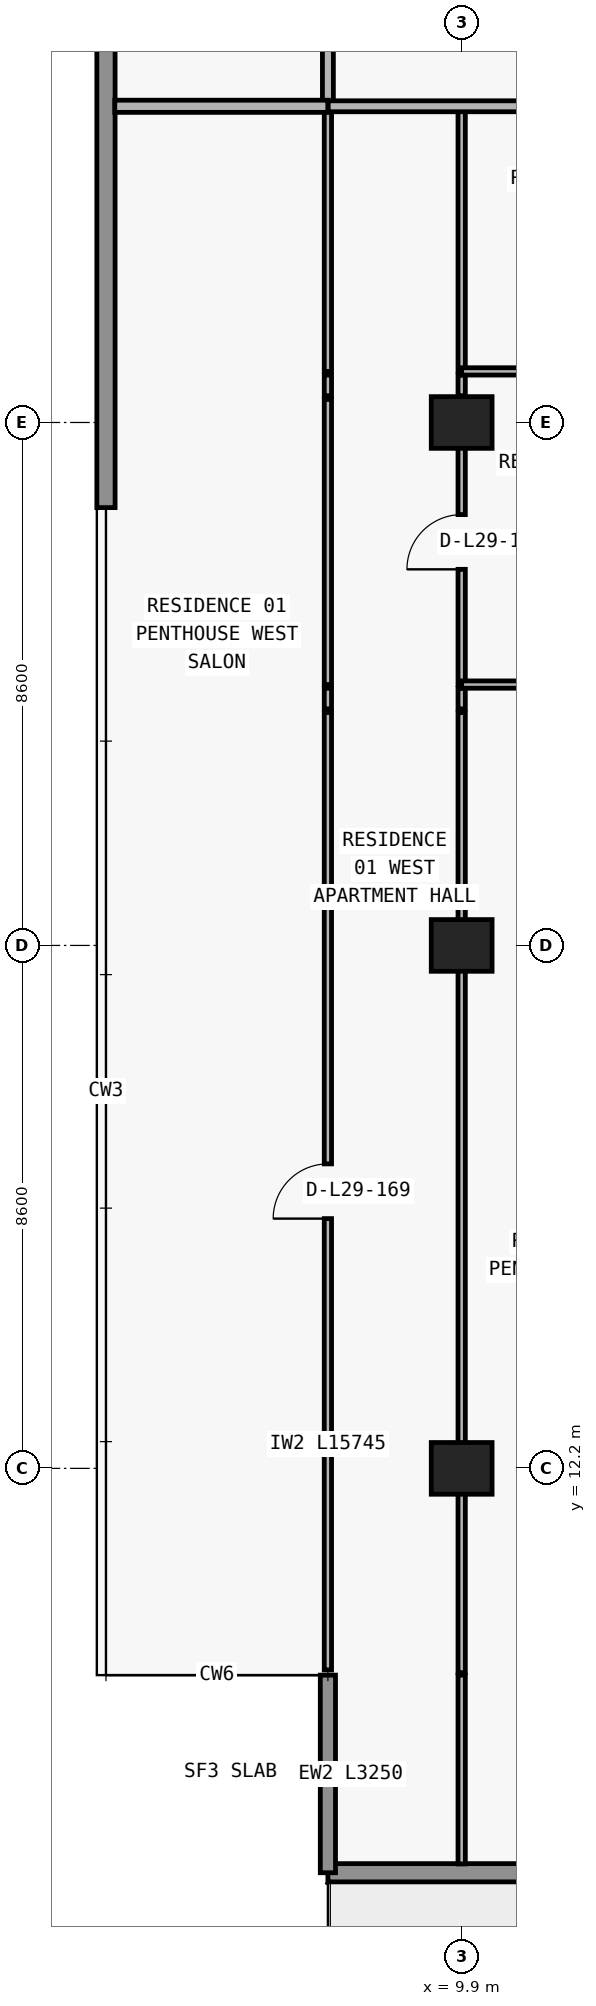
"""IFC4 building model, lengths in metres.
Left out: names, types, materials, properties, quantities, classifications, styles, units other than length and angle.
Written with IfcOpenShell. Run it as: python <this file> out.ifc"""

import sys

from ifc_helpers import new_model, si_unit, direction, frame, frame_2d, origin, origin_2d, place, context, subcontext, project, spatial, rectangle, extrude, element, fill, save


model = new_model("IFC4")
c1 = context("Model", 3, precision=1e-05, world=origin(), true_north=direction((0.0, 1.0)))
c2 = subcontext(c1, "Body", "Model", "MODEL_VIEW")
j1 = project(units=[si_unit("LENGTHUNIT", "METRE"), si_unit("PLANEANGLEUNIT", "RADIAN")], contexts=[c1])
p1 = place(None, origin())
s1 = spatial("IfcSite", under=j1, at=p1, CompositionType="ELEMENT")
p2 = place(p1, origin())
s2 = spatial("IfcBuilding", under=s1, at=p2, CompositionType="ELEMENT")
p3 = place(p2, frame((0.0, 0.0, 109.2)))
s3 = spatial("IfcBuildingStorey", under=s2, at=p3, CompositionType="ELEMENT", Elevation=109.2)
for number, where, z_axis, x_axis in (
    (1, (9.9, 12.2, 0.0), (0.0, 0.0, 1.0), (1.0, 0.0, 0.0)),
    (2, (9.9, 20.8, 0.0), (0.0, 0.0, 1.0), (1.0, 0.0, 0.0)),
    (3, (9.9, 29.4, 0.0), (0.0, 0.0, 1.0), (1.0, 0.0, 0.0)),
):
    element("IfcColumn", number, at=place(p3, frame(where, z_axis=z_axis, x_axis=x_axis)), inside=s3, PredefinedType="COLUMN", context=c2, shape_type="SweptSolid", body=[
        extrude(rectangle(XDim=1.0, YDim=0.85, at=origin_2d()), origin(), (0.0, 0.0, 1.0), 3.05),
    ])
p4 = place(p3, frame((70.1, 5.55, 0.0), z_axis=(0.0, 0.0, 1.0), x_axis=(-1.0, 0.0, 0.0)))
e4 = element("IfcWall", 4, at=p4, inside=s3, PredefinedType="STANDARD", context=c2, shape_type="SweptSolid", body=[
    extrude(rectangle(XDim=62.4, YDim=0.3, at=frame_2d((31.2, 0.0))), origin(), (0.0, 0.0, 1.0), 3.05),
])
p5 = place(p4, frame((57.226, 0.0, 0.0)))
e5 = element("IfcOpeningElement", 5, at=p5, cuts=e4, PredefinedType="OPENING", context=c2, shape_type="SweptSolid", body=[
    extrude(rectangle(XDim=2.0, YDim=2.3, at=frame_2d((1.0, 1.15))), frame((0.0, 0.16, 0.0), z_axis=(0.0, -1.0, 0.0), x_axis=(1.0, 0.0, 0.0)), (0.0, 0.0, 1.0), 0.32),
])
p6 = place(p4, frame((52.926, 0.0, 0.85)))
e6 = element("IfcOpeningElement", 6, at=p6, cuts=e4, PredefinedType="OPENING", context=c2, shape_type="SweptSolid", body=[
    extrude(rectangle(XDim=2.2, YDim=1.55, at=frame_2d((1.1, 0.775))), frame((0.0, 0.16, 0.0), z_axis=(0.0, -1.0, 0.0), x_axis=(1.0, 0.0, 0.0)), (0.0, 0.0, 1.0), 0.32),
])
p7 = place(p4, frame((48.49, 0.0, 0.0)))
e7 = element("IfcOpeningElement", 7, at=p7, cuts=e4, PredefinedType="OPENING", context=c2, shape_type="SweptSolid", body=[
    extrude(rectangle(XDim=2.0, YDim=2.3, at=frame_2d((1.0, 1.15))), frame((0.0, 0.16, 0.0), z_axis=(0.0, -1.0, 0.0), x_axis=(1.0, 0.0, 0.0)), (0.0, 0.0, 1.0), 0.32),
])
p8 = place(p4, frame((44.39, 0.0, 0.85)))
e8 = element("IfcOpeningElement", 8, at=p8, cuts=e4, PredefinedType="OPENING", context=c2, shape_type="SweptSolid", body=[
    extrude(rectangle(XDim=1.8, YDim=1.55, at=frame_2d((0.9, 0.775))), frame((0.0, 0.16, 0.0), z_axis=(0.0, -1.0, 0.0), x_axis=(1.0, 0.0, 0.0)), (0.0, 0.0, 1.0), 0.32),
])
p9 = place(p4, frame((40.49, 0.0, 0.0)))
e9 = element("IfcOpeningElement", 9, at=p9, cuts=e4, PredefinedType="OPENING", context=c2, shape_type="SweptSolid", body=[
    extrude(rectangle(XDim=2.0, YDim=2.3, at=frame_2d((1.0, 1.15))), frame((0.0, 0.16, 0.0), z_axis=(0.0, -1.0, 0.0), x_axis=(1.0, 0.0, 0.0)), (0.0, 0.0, 1.0), 0.32),
])
p10 = place(p4, frame((35.81, 0.0, 0.65)))
e10 = element("IfcOpeningElement", 10, at=p10, cuts=e4, PredefinedType="OPENING", context=c2, shape_type="SweptSolid", body=[
    extrude(rectangle(XDim=2.6, YDim=1.85, at=frame_2d((1.3, 0.925))), frame((0.0, 0.16, 0.0), z_axis=(0.0, -1.0, 0.0), x_axis=(1.0, 0.0, 0.0)), (0.0, 0.0, 1.0), 0.32),
])
p11 = place(p4, frame((30.1, 0.0, 0.85)))
e11 = element("IfcOpeningElement", 11, at=p11, cuts=e4, PredefinedType="OPENING", context=c2, shape_type="SweptSolid", body=[
    extrude(rectangle(XDim=2.2, YDim=1.55, at=frame_2d((1.1, 0.775))), frame((0.0, 0.16, 0.0), z_axis=(0.0, -1.0, 0.0), x_axis=(1.0, 0.0, 0.0)), (0.0, 0.0, 1.0), 0.32),
])
p12 = place(p4, frame((22.1, 0.0, 0.85)))
e12 = element("IfcOpeningElement", 12, at=p12, cuts=e4, PredefinedType="OPENING", context=c2, shape_type="SweptSolid", body=[
    extrude(rectangle(XDim=2.2, YDim=1.55, at=frame_2d((1.1, 0.775))), frame((0.0, 0.16, 0.0), z_axis=(0.0, -1.0, 0.0), x_axis=(1.0, 0.0, 0.0)), (0.0, 0.0, 1.0), 0.32),
])
p13 = place(p4, frame((15.69, 0.0, 0.0)))
e13 = element("IfcOpeningElement", 13, at=p13, cuts=e4, PredefinedType="OPENING", context=c2, shape_type="SweptSolid", body=[
    extrude(rectangle(XDim=2.0, YDim=2.3, at=frame_2d((1.0, 1.15))), frame((0.0, 0.16, 0.0), z_axis=(0.0, -1.0, 0.0), x_axis=(1.0, 0.0, 0.0)), (0.0, 0.0, 1.0), 0.32),
])
p14 = place(p4, frame((11.59, 0.0, 0.85)))
e14 = element("IfcOpeningElement", 14, at=p14, cuts=e4, PredefinedType="OPENING", context=c2, shape_type="SweptSolid", body=[
    extrude(rectangle(XDim=1.8, YDim=1.55, at=frame_2d((0.9, 0.775))), frame((0.0, 0.16, 0.0), z_axis=(0.0, -1.0, 0.0), x_axis=(1.0, 0.0, 0.0)), (0.0, 0.0, 1.0), 0.32),
])
p15 = place(p4, frame((7.626, 0.0, 0.0)))
e15 = element("IfcOpeningElement", 15, at=p15, cuts=e4, PredefinedType="OPENING", context=c2, shape_type="SweptSolid", body=[
    extrude(rectangle(XDim=2.0, YDim=2.3, at=frame_2d((1.0, 1.15))), frame((0.0, 0.16, 0.0), z_axis=(0.0, -1.0, 0.0), x_axis=(1.0, 0.0, 0.0)), (0.0, 0.0, 1.0), 0.32),
])
p16 = place(p4, frame((3.326, 0.0, 0.85)))
e16 = element("IfcOpeningElement", 16, at=p16, cuts=e4, PredefinedType="OPENING", context=c2, shape_type="SweptSolid", body=[
    extrude(rectangle(XDim=2.2, YDim=1.55, at=frame_2d((1.1, 0.775))), frame((0.0, 0.16, 0.0), z_axis=(0.0, -1.0, 0.0), x_axis=(1.0, 0.0, 0.0)), (0.0, 0.0, 1.0), 0.32),
])
p17 = place(p3, frame((7.7, 8.8, 0.0), z_axis=(0.0, 0.0, 1.0), x_axis=(0.0, -1.0, 0.0)))
e17 = element("IfcWall", 17, at=p17, inside=s3, PredefinedType="ELEMENTEDWALL", context=c2, shape_type="SweptSolid", body=[
    extrude(rectangle(XDim=3.25, YDim=0.25, at=frame_2d((1.625, 0.0))), origin(), (0.0, 0.0, 1.0), 3.05),
])
p18 = place(p3, frame((4.05, 28.0, 0.0), z_axis=(0.0, 0.0, 1.0), x_axis=(0.0, 1.0, 0.0)))
e18 = element("IfcWall", 18, at=p18, inside=s3, PredefinedType="STANDARD", context=c2, shape_type="SweptSolid", body=[
    extrude(rectangle(XDim=19.2, YDim=0.3, at=frame_2d((9.6, 0.0))), origin(), (0.0, 0.0, 1.0), 3.05),
])
p19 = place(p3, frame((7.7, 8.885, 0.0), z_axis=(0.0, 0.0, 1.0), x_axis=(0.0, 1.0, 0.0)))
e19 = element("IfcWall", 19, at=p19, inside=s3, PredefinedType="PARTITIONING", context=c2, shape_type="SweptSolid", body=[
    extrude(rectangle(XDim=15.745, YDim=0.12, at=frame_2d((7.873, 0.0))), origin(), (0.0, 0.0, 1.0), 3.05),
])
p20 = place(p19, frame((7.423, 0.0, 0.0)))
e20 = element("IfcOpeningElement", 20, at=p20, cuts=e19, PredefinedType="OPENING", context=c2, shape_type="SweptSolid", body=[
    extrude(rectangle(XDim=0.9, YDim=2.15, at=frame_2d((0.45, 1.075))), frame((0.0, 0.07, 0.0), z_axis=(0.0, -1.0, 0.0), x_axis=(1.0, 0.0, 0.0)), (0.0, 0.0, 1.0), 0.14),
])
p21 = place(p3, frame((7.7, 24.69, 0.0), z_axis=(0.0, 0.0, 1.0), x_axis=(0.0, 1.0, 0.0)))
e21 = element("IfcWall", 21, at=p21, inside=s3, PredefinedType="PARTITIONING", context=c2, shape_type="SweptSolid", body=[
    extrude(rectangle(XDim=0.34, YDim=0.12, at=frame_2d((0.17, 0.0))), origin(), (0.0, 0.0, 1.0), 3.05),
])
p22 = place(p3, frame((7.7, 25.09, 0.0), z_axis=(0.0, 0.0, 1.0), x_axis=(0.0, 1.0, 0.0)))
e22 = element("IfcWall", 22, at=p22, inside=s3, PredefinedType="PARTITIONING", context=c2, shape_type="SweptSolid", body=[
    extrude(rectangle(XDim=4.69, YDim=0.12, at=frame_2d((2.345, 0.0))), origin(), (0.0, 0.0, 1.0), 3.05),
])
p23 = place(p3, frame((7.7, 29.84, 0.0), z_axis=(0.0, 0.0, 1.0), x_axis=(0.0, 1.0, 0.0)))
e23 = element("IfcWall", 23, at=p23, inside=s3, PredefinedType="PARTITIONING", context=c2, shape_type="SweptSolid", body=[
    extrude(rectangle(XDim=0.34, YDim=0.12, at=frame_2d((0.17, 0.0))), origin(), (0.0, 0.0, 1.0), 3.05),
])
p24 = place(p3, frame((7.7, 30.24, 0.0), z_axis=(0.0, 0.0, 1.0), x_axis=(0.0, 1.0, 0.0)))
e24 = element("IfcWall", 24, at=p24, inside=s3, PredefinedType="PARTITIONING", context=c2, shape_type="SweptSolid", body=[
    extrude(rectangle(XDim=4.36, YDim=0.12, at=frame_2d((2.18, 0.0))), origin(), (0.0, 0.0, 1.0), 3.05),
])
p25 = place(p3, frame((7.7, 34.605, 0.0), z_axis=(0.0, 0.0, 1.0), x_axis=(0.0, 1.0, 0.0)))
e25 = element("IfcWall", 25, at=p25, inside=s3, PredefinedType="PARTITIONING", context=c2, shape_type="SweptSolid", body=[
    extrude(rectangle(XDim=2.345, YDim=0.18, at=frame_2d((1.172, 0.0))), origin(), (0.0, 0.0, 1.0), 3.05),
])
p26 = place(p3, frame((9.9, 5.695, 0.0), z_axis=(0.0, 0.0, 1.0), x_axis=(0.0, 1.0, 0.0)))
e26 = element("IfcWall", 26, at=p26, inside=s3, PredefinedType="PARTITIONING", context=c2, shape_type="SweptSolid", body=[
    extrude(rectangle(XDim=3.105, YDim=0.12, at=frame_2d((1.552, 0.0))), origin(), (0.0, 0.0, 1.0), 3.05),
])
p27 = place(p3, frame((9.9, 8.84, 0.0), z_axis=(0.0, 0.0, 1.0), x_axis=(0.0, 1.0, 0.0)))
e27 = element("IfcWall", 27, at=p27, inside=s3, PredefinedType="PARTITIONING", context=c2, shape_type="SweptSolid", body=[
    extrude(rectangle(XDim=15.79, YDim=0.12, at=frame_2d((7.895, 0.0))), origin(), (0.0, 0.0, 1.0), 2.174),
])
p28 = place(p3, frame((9.9, 24.69, 0.0), z_axis=(0.0, 0.0, 1.0), x_axis=(0.0, 1.0, 0.0)))
e28 = element("IfcWall", 28, at=p28, inside=s3, PredefinedType="PARTITIONING", context=c2, shape_type="SweptSolid", body=[
    extrude(rectangle(XDim=0.34, YDim=0.12, at=frame_2d((0.17, 0.0))), origin(), (0.0, 0.0, 1.0), 2.174),
])
p29 = place(p3, frame((9.9, 25.09, 0.0), z_axis=(0.0, 0.0, 1.0), x_axis=(0.0, 1.0, 0.0)))
e29 = element("IfcWall", 29, at=p29, inside=s3, PredefinedType="PARTITIONING", context=c2, shape_type="SweptSolid", body=[
    extrude(rectangle(XDim=4.69, YDim=0.12, at=frame_2d((2.345, 0.0))), origin(), (0.0, 0.0, 1.0), 2.174),
])
p30 = place(p29, frame((1.895, 0.0, 0.0)))
e30 = element("IfcOpeningElement", 30, at=p30, cuts=e29, PredefinedType="OPENING", context=c2, shape_type="SweptSolid", body=[
    extrude(rectangle(XDim=0.9, YDim=2.124, at=frame_2d((0.45, 1.062))), frame((0.0, 0.07, 0.0), z_axis=(0.0, -1.0, 0.0), x_axis=(1.0, 0.0, 0.0)), (0.0, 0.0, 1.0), 0.14),
])
p31 = place(p3, frame((9.9, 29.84, 0.0), z_axis=(0.0, 0.0, 1.0), x_axis=(0.0, 1.0, 0.0)))
e31 = element("IfcWall", 31, at=p31, inside=s3, PredefinedType="PARTITIONING", context=c2, shape_type="SweptSolid", body=[
    extrude(rectangle(XDim=0.34, YDim=0.12, at=frame_2d((0.17, 0.0))), origin(), (0.0, 0.0, 1.0), 2.174),
])
p32 = place(p3, frame((9.9, 30.24, 0.0), z_axis=(0.0, 0.0, 1.0), x_axis=(0.0, 1.0, 0.0)))
e32 = element("IfcWall", 32, at=p32, inside=s3, PredefinedType="PARTITIONING", context=c2, shape_type="SweptSolid", body=[
    extrude(rectangle(XDim=4.36, YDim=0.12, at=frame_2d((2.18, 0.0))), origin(), (0.0, 0.0, 1.0), 2.174),
])
p33 = place(p3, frame((9.9, 25.09, 0.0), z_axis=(0.0, 0.0, 1.0), x_axis=(1.0, 0.0, 0.0)))
e33 = element("IfcWall", 33, at=p33, inside=s3, PredefinedType="PARTITIONING", context=c2, shape_type="SweptSolid", body=[
    extrude(rectangle(XDim=8.35, YDim=0.12, at=frame_2d((4.175, 0.0))), origin(), (0.0, 0.0, 1.0), 3.05),
])
p34 = place(p33, frame((1.524, 0.0, 0.0)))
e34 = element("IfcOpeningElement", 34, at=p34, cuts=e33, PredefinedType="OPENING", context=c2, shape_type="SweptSolid", body=[
    extrude(rectangle(XDim=0.9, YDim=2.15, at=frame_2d((0.45, 1.075))), frame((0.0, 0.07, 0.0), z_axis=(0.0, -1.0, 0.0), x_axis=(1.0, 0.0, 0.0)), (0.0, 0.0, 1.0), 0.14),
])
p35 = place(p33, frame((5.868, 0.0, 0.0)))
e35 = element("IfcOpeningElement", 35, at=p35, cuts=e33, PredefinedType="OPENING", context=c2, shape_type="SweptSolid", body=[
    extrude(rectangle(XDim=0.9, YDim=2.15, at=frame_2d((0.45, 1.075))), frame((0.0, 0.07, 0.0), z_axis=(0.0, -1.0, 0.0), x_axis=(1.0, 0.0, 0.0)), (0.0, 0.0, 1.0), 0.14),
])
p36 = place(p3, frame((9.9, 30.24, 0.0), z_axis=(0.0, 0.0, 1.0), x_axis=(1.0, 0.0, 0.0)))
e36 = element("IfcWall", 36, at=p36, inside=s3, PredefinedType="PARTITIONING", context=c2, shape_type="SweptSolid", body=[
    extrude(rectangle(XDim=8.35, YDim=0.12, at=frame_2d((4.175, 0.0))), origin(), (0.0, 0.0, 1.0), 3.05),
])
p37 = place(p36, frame((1.693, 0.0, 0.0)))
e37 = element("IfcOpeningElement", 37, at=p37, cuts=e36, PredefinedType="OPENING", context=c2, shape_type="SweptSolid", body=[
    extrude(rectangle(XDim=0.9, YDim=2.15, at=frame_2d((0.45, 1.075))), frame((0.0, 0.07, 0.0), z_axis=(0.0, -1.0, 0.0), x_axis=(1.0, 0.0, 0.0)), (0.0, 0.0, 1.0), 0.14),
])
p38 = place(p3, frame((4.195, 34.6, 0.0), z_axis=(0.0, 0.0, 1.0), x_axis=(1.0, 0.0, 0.0)))
e38 = element("IfcWall", 38, at=p38, inside=s3, PredefinedType="PARTITIONING", context=c2, shape_type="SweptSolid", body=[
    extrude(rectangle(XDim=3.505, YDim=0.2, at=frame_2d((1.752, 0.0))), origin(), (0.0, 0.0, 1.0), 3.05),
])
p39 = place(p3, frame((7.705, 34.6, 0.0), z_axis=(0.0, 0.0, 1.0), x_axis=(1.0, 0.0, 0.0)))
e39 = element("IfcWall", 39, at=p39, inside=s3, PredefinedType="PARTITIONING", context=c2, shape_type="SweptSolid", body=[
    extrude(rectangle(XDim=10.545, YDim=0.18, at=frame_2d((5.272, 0.0))), origin(), (0.0, 0.0, 1.0), 3.05),
])
p40 = place(p39, frame((4.714, 0.0, 0.0)))
e40 = element("IfcOpeningElement", 40, at=p40, cuts=e39, PredefinedType="OPENING", context=c2, shape_type="SweptSolid", body=[
    extrude(rectangle(XDim=1.0, YDim=2.2, at=frame_2d((0.5, 1.1))), frame((0.0, 0.1, 0.0), z_axis=(0.0, -1.0, 0.0), x_axis=(1.0, 0.0, 0.0)), (0.0, 0.0, 1.0), 0.2),
])
p41 = place(p30, origin())
e41 = element("IfcDoor", 41, at=p41, inside=s3, OperationType="SINGLE_SWING_LEFT", PredefinedType="DOOR", context=c2, shape_type="SweptSolid", body=[
    extrude(rectangle(XDim=0.9, YDim=2.124, at=frame_2d((0.45, 1.062))), frame((0.0, 0.025, 0.0), z_axis=(0.0, -1.0, 0.0), x_axis=(1.0, 0.0, 0.0)), (0.0, 0.0, 1.0), 0.05),
])
fill(e30, e41)
p42 = place(p20, origin())
e42 = element("IfcDoor", 42, at=p42, inside=s3, OperationType="SINGLE_SWING_LEFT", PredefinedType="DOOR", context=c2, shape_type="SweptSolid", body=[
    extrude(rectangle(XDim=0.9, YDim=2.15, at=frame_2d((0.45, 1.075))), frame((0.0, 0.025, 0.0), z_axis=(0.0, -1.0, 0.0), x_axis=(1.0, 0.0, 0.0)), (0.0, 0.0, 1.0), 0.05),
])
fill(e20, e42)
save(model, sys.argv[1])
